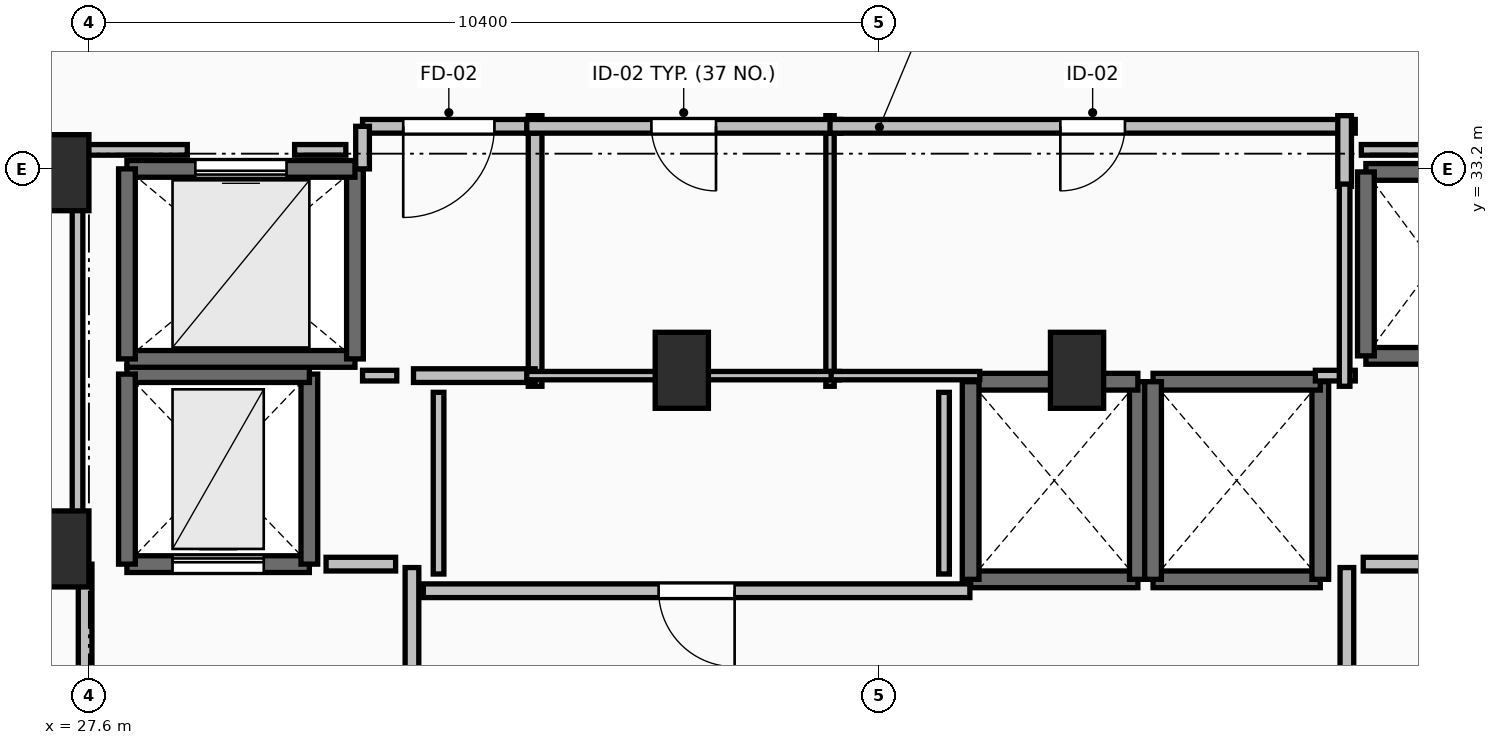
"""IFC4 building model, lengths in metres.
Left out: names, types, materials, properties, quantities, classifications, styles, units other than length and angle.
Written with IfcOpenShell. Run it as: python <this file> out.ifc"""

import sys

from ifc_helpers import new_model, si_unit, direction, frame, frame_2d, origin, origin_2d, place, context, subcontext, project, spatial, rectangle, extrude, element, fill, save


model = new_model("IFC4")
c1 = context("Model", 3, precision=1e-05, world=origin(), true_north=direction((0.0, 1.0)))
c2 = subcontext(c1, "Body", "Model", "MODEL_VIEW")
j1 = project(units=[si_unit("LENGTHUNIT", "METRE"), si_unit("PLANEANGLEUNIT", "RADIAN")], contexts=[c1])
p1 = place(None, origin())
s1 = spatial("IfcSite", under=j1, at=p1, CompositionType="ELEMENT")
p2 = place(p1, origin())
s2 = spatial("IfcBuilding", under=s1, at=p2, CompositionType="ELEMENT")
p3 = place(p2, frame((0.0, 0.0, 182.6)))
s3 = spatial("IfcBuildingStorey", under=s2, at=p3, CompositionType="ELEMENT", Elevation=182.6)
for number, where, z_axis, x_axis in (
    (1, (27.25, 28.2, 0.0), (0.0, 0.0, 1.0), (1.0, 0.0, 0.0)),
    (2, (27.25, 33.15, 0.0), (0.0, 0.0, 1.0), (1.0, 0.0, 0.0)),
    (3, (35.4, 30.55, 0.0), (0.0, 0.0, 1.0), (1.0, 0.0, 0.0)),
    (4, (40.6, 30.55, 0.0), (0.0, 0.0, 1.0), (1.0, 0.0, 0.0)),
):
    element("IfcColumn", number, at=place(p3, frame(where, z_axis=z_axis, x_axis=x_axis)), inside=s3, PredefinedType="PILASTER", context=c2, shape_type="SweptSolid", body=[
        extrude(rectangle(XDim=0.7, YDim=1.0, at=origin_2d()), origin(), (0.0, 0.0, 1.0), 3.5),
    ])
p4 = place(p3, frame((39.2, 27.8, 0.0), z_axis=(0.0, 0.0, 1.0), x_axis=(1.0, 0.0, 0.0)))
e5 = element("IfcWall", 5, at=p4, inside=s3, PredefinedType="SOLIDWALL", context=c2, shape_type="SweptSolid", body=[
    extrude(rectangle(XDim=2.2, YDim=0.22, at=frame_2d((1.1, 0.0))), origin(), (0.0, 0.0, 1.0), 3.24),
])
p5 = place(p3, frame((41.4, 27.8, 0.0), z_axis=(0.0, 0.0, 1.0), x_axis=(0.0, 1.0, 0.0)))
e6 = element("IfcWall", 6, at=p5, inside=s3, PredefinedType="SOLIDWALL", context=c2, shape_type="SweptSolid", body=[
    extrude(rectangle(XDim=2.6, YDim=0.22, at=frame_2d((1.3, 0.0))), origin(), (0.0, 0.0, 1.0), 3.24),
])
p6 = place(p3, frame((41.4, 30.4, 0.0), z_axis=(0.0, 0.0, 1.0), x_axis=(-1.0, 0.0, 0.0)))
e7 = element("IfcWall", 7, at=p6, inside=s3, PredefinedType="SOLIDWALL", context=c2, shape_type="SweptSolid", body=[
    extrude(rectangle(XDim=2.2, YDim=0.22, at=frame_2d((1.1, 0.0))), origin(), (0.0, 0.0, 1.0), 3.24),
])
p7 = place(p3, frame((39.2, 30.4, 0.0), z_axis=(0.0, 0.0, 1.0), x_axis=(0.0, -1.0, 0.0)))
e8 = element("IfcWall", 8, at=p7, inside=s3, PredefinedType="SOLIDWALL", context=c2, shape_type="SweptSolid", body=[
    extrude(rectangle(XDim=2.6, YDim=0.22, at=frame_2d((1.3, 0.0))), origin(), (0.0, 0.0, 1.0), 3.24),
])
p8 = place(p3, frame((41.6, 27.8, 0.0), z_axis=(0.0, 0.0, 1.0), x_axis=(1.0, 0.0, 0.0)))
e9 = element("IfcWall", 9, at=p8, inside=s3, PredefinedType="SOLIDWALL", context=c2, shape_type="SweptSolid", body=[
    extrude(rectangle(XDim=2.2, YDim=0.22, at=frame_2d((1.1, 0.0))), origin(), (0.0, 0.0, 1.0), 3.24),
])
p9 = place(p3, frame((43.8, 27.8, 0.0), z_axis=(0.0, 0.0, 1.0), x_axis=(0.0, 1.0, 0.0)))
e10 = element("IfcWall", 10, at=p9, inside=s3, PredefinedType="SOLIDWALL", context=c2, shape_type="SweptSolid", body=[
    extrude(rectangle(XDim=2.6, YDim=0.22, at=frame_2d((1.3, 0.0))), origin(), (0.0, 0.0, 1.0), 3.24),
])
p10 = place(p3, frame((43.8, 30.4, 0.0), z_axis=(0.0, 0.0, 1.0), x_axis=(-1.0, 0.0, 0.0)))
e11 = element("IfcWall", 11, at=p10, inside=s3, PredefinedType="SOLIDWALL", context=c2, shape_type="SweptSolid", body=[
    extrude(rectangle(XDim=2.2, YDim=0.22, at=frame_2d((1.1, 0.0))), origin(), (0.0, 0.0, 1.0), 3.24),
])
p11 = place(p3, frame((41.6, 30.4, 0.0), z_axis=(0.0, 0.0, 1.0), x_axis=(0.0, -1.0, 0.0)))
e12 = element("IfcWall", 12, at=p11, inside=s3, PredefinedType="SOLIDWALL", context=c2, shape_type="SweptSolid", body=[
    extrude(rectangle(XDim=2.6, YDim=0.22, at=frame_2d((1.3, 0.0))), origin(), (0.0, 0.0, 1.0), 3.24),
])
for number, where, z_axis, x_axis in (
    (13, (44.4, 30.74, 0.0), (0.0, 0.0, 1.0), (1.0, 0.0, 0.0)),
    (14, (46.2, 33.16, 0.0), (0.0, 0.0, 1.0), (-1.0, 0.0, 0.0)),
):
    element("IfcWall", number, at=place(p3, frame(where, z_axis=z_axis, x_axis=x_axis)), inside=s3, PredefinedType="SOLIDWALL", context=c2, shape_type="SweptSolid", body=[
        extrude(rectangle(XDim=1.8, YDim=0.22, at=frame_2d((0.9, 0.0))), origin(), (0.0, 0.0, 1.0), 3.24),
    ])
p12 = place(p3, frame((44.4, 33.16, 0.0), z_axis=(0.0, 0.0, 1.0), x_axis=(0.0, -1.0, 0.0)))
e15 = element("IfcWall", 15, at=p12, inside=s3, PredefinedType="SOLIDWALL", context=c2, shape_type="SweptSolid", body=[
    extrude(rectangle(XDim=2.42, YDim=0.22, at=frame_2d((1.21, 0.0))), origin(), (0.0, 0.0, 1.0), 3.24),
])
p13 = place(p3, frame((28.1, 28.0, 0.0), z_axis=(0.0, 0.0, 1.0), x_axis=(1.0, 0.0, 0.0)))
e16 = element("IfcWall", 16, at=p13, inside=s3, PredefinedType="SHEAR", context=c2, shape_type="SweptSolid", body=[
    extrude(rectangle(XDim=2.4, YDim=0.22, at=frame_2d((1.2, 0.0))), origin(), (0.0, 0.0, 1.0), 3.24),
])
p14 = place(p13, frame((0.6, 0.0, 0.0)))
e17 = element("IfcOpeningElement", 17, at=p14, cuts=e16, PredefinedType="OPENING", context=c2, shape_type="SweptSolid", body=[
    extrude(rectangle(XDim=1.2, YDim=2.2, at=frame_2d((0.6, 1.1))), frame((0.0, 0.125, 0.0), z_axis=(0.0, -1.0, 0.0), x_axis=(1.0, 0.0, 0.0)), (0.0, 0.0, 1.0), 0.25),
])
p15 = place(p3, frame((30.5, 28.0, 0.0), z_axis=(0.0, 0.0, 1.0), x_axis=(0.0, 1.0, 0.0)))
e18 = element("IfcWall", 18, at=p15, inside=s3, PredefinedType="SHEAR", context=c2, shape_type="SweptSolid", body=[
    extrude(rectangle(XDim=2.5, YDim=0.22, at=frame_2d((1.25, 0.0))), origin(), (0.0, 0.0, 1.0), 3.24),
])
p16 = place(p3, frame((30.5, 30.5, 0.0), z_axis=(0.0, 0.0, 1.0), x_axis=(-1.0, 0.0, 0.0)))
e19 = element("IfcWall", 19, at=p16, inside=s3, PredefinedType="SHEAR", context=c2, shape_type="SweptSolid", body=[
    extrude(rectangle(XDim=2.4, YDim=0.22, at=frame_2d((1.2, 0.0))), origin(), (0.0, 0.0, 1.0), 3.24),
])
p17 = place(p3, frame((28.1, 30.5, 0.0), z_axis=(0.0, 0.0, 1.0), x_axis=(0.0, -1.0, 0.0)))
e20 = element("IfcWall", 20, at=p17, inside=s3, PredefinedType="SHEAR", context=c2, shape_type="SweptSolid", body=[
    extrude(rectangle(XDim=2.5, YDim=0.22, at=frame_2d((1.25, 0.0))), origin(), (0.0, 0.0, 1.0), 3.24),
])
p18 = place(p3, frame((28.1, 30.7, 0.0), z_axis=(0.0, 0.0, 1.0), x_axis=(1.0, 0.0, 0.0)))
e21 = element("IfcWall", 21, at=p18, inside=s3, PredefinedType="SOLIDWALL", context=c2, shape_type="SweptSolid", body=[
    extrude(rectangle(XDim=3.0, YDim=0.22, at=frame_2d((1.5, 0.0))), origin(), (0.0, 0.0, 1.0), 3.24),
])
p19 = place(p3, frame((31.1, 30.7, 0.0), z_axis=(0.0, 0.0, 1.0), x_axis=(0.0, 1.0, 0.0)))
e22 = element("IfcWall", 22, at=p19, inside=s3, PredefinedType="SOLIDWALL", context=c2, shape_type="SweptSolid", body=[
    extrude(rectangle(XDim=2.5, YDim=0.22, at=frame_2d((1.25, 0.0))), origin(), (0.0, 0.0, 1.0), 3.24),
])
p20 = place(p3, frame((31.1, 33.2, 0.0), z_axis=(0.0, 0.0, 1.0), x_axis=(-1.0, 0.0, 0.0)))
e23 = element("IfcWall", 23, at=p20, inside=s3, PredefinedType="SOLIDWALL", context=c2, shape_type="SweptSolid", body=[
    extrude(rectangle(XDim=3.0, YDim=0.22, at=frame_2d((1.5, 0.0))), origin(), (0.0, 0.0, 1.0), 3.24),
])
p21 = place(p20, frame((0.9, 0.0, 0.0)))
e24 = element("IfcOpeningElement", 24, at=p21, cuts=e23, PredefinedType="OPENING", context=c2, shape_type="SweptSolid", body=[
    extrude(rectangle(XDim=1.2, YDim=2.2, at=frame_2d((0.6, 1.1))), frame((0.0, 0.125, 0.0), z_axis=(0.0, -1.0, 0.0), x_axis=(1.0, 0.0, 0.0)), (0.0, 0.0, 1.0), 0.25),
])
p22 = place(p3, frame((28.1, 33.2, 0.0), z_axis=(0.0, 0.0, 1.0), x_axis=(0.0, -1.0, 0.0)))
e25 = element("IfcWall", 25, at=p22, inside=s3, PredefinedType="SOLIDWALL", context=c2, shape_type="SweptSolid", body=[
    extrude(rectangle(XDim=2.5, YDim=0.22, at=frame_2d((1.25, 0.0))), origin(), (0.0, 0.0, 1.0), 3.24),
])
p23 = place(p3, frame((31.85, 24.045, 0.0), z_axis=(0.0, 0.0, 1.0), x_axis=(0.0, 1.0, 0.0)))
e26 = element("IfcWall", 26, at=p23, inside=s3, PredefinedType="PARTITIONING", context=c2, shape_type="SweptSolid", body=[
    extrude(rectangle(XDim=3.91, YDim=0.18, at=frame_2d((1.955, 0.0))), origin(), (0.0, 0.0, 1.0), 3.24),
])
p24 = place(p23, frame((1.355, 0.0, 0.0)))
e27 = element("IfcOpeningElement", 27, at=p24, cuts=e26, PredefinedType="OPENING", context=c2, shape_type="SweptSolid", body=[
    extrude(rectangle(XDim=1.2, YDim=2.15, at=frame_2d((0.6, 1.075))), frame((0.0, 0.105, 0.0), z_axis=(0.0, -1.0, 0.0), x_axis=(1.0, 0.0, 0.0)), (0.0, 0.0, 1.0), 0.21),
])
p25 = place(p3, frame((27.55, 28.0, 0.0), z_axis=(0.0, 0.0, 1.0), x_axis=(0.0, -1.0, 0.0)))
e28 = element("IfcWall", 28, at=p25, inside=s3, PredefinedType="PARTITIONING", context=c2, shape_type="SweptSolid", body=[
    extrude(rectangle(XDim=4.05, YDim=0.18, at=frame_2d((2.025, 0.0))), origin(), (0.0, 0.0, 1.0), 3.24),
])
p26 = place(p25, frame((1.425, 0.0, 0.0)))
e29 = element("IfcOpeningElement", 29, at=p26, cuts=e28, PredefinedType="OPENING", context=c2, shape_type="SweptSolid", body=[
    extrude(rectangle(XDim=1.2, YDim=2.15, at=frame_2d((0.6, 1.075))), frame((0.0, 0.105, 0.0), z_axis=(0.0, -1.0, 0.0), x_axis=(1.0, 0.0, 0.0)), (0.0, 0.0, 1.0), 0.21),
])
p27 = place(p3, frame((44.15, 27.955, 0.0), z_axis=(0.0, 0.0, 1.0), x_axis=(0.0, -1.0, 0.0)))
e30 = element("IfcWall", 30, at=p27, inside=s3, PredefinedType="PARTITIONING", context=c2, shape_type="SweptSolid", body=[
    extrude(rectangle(XDim=3.91, YDim=0.18, at=frame_2d((1.955, 0.0))), origin(), (0.0, 0.0, 1.0), 3.24),
])
p28 = place(p27, frame((1.355, 0.0, 0.0)))
e31 = element("IfcOpeningElement", 31, at=p28, cuts=e30, PredefinedType="OPENING", context=c2, shape_type="SweptSolid", body=[
    extrude(rectangle(XDim=1.2, YDim=2.15, at=frame_2d((0.6, 1.075))), frame((0.0, 0.105, 0.0), z_axis=(0.0, -1.0, 0.0), x_axis=(1.0, 0.0, 0.0)), (0.0, 0.0, 1.0), 0.21),
])
p29 = place(p3, frame((33.47, 30.34, 0.0), z_axis=(0.0, 0.0, 1.0), x_axis=(0.0, 1.0, 0.0)))
e32 = element("IfcWall", 32, at=p29, inside=s3, PredefinedType="PARTITIONING", context=c2, shape_type="SweptSolid", body=[
    extrude(rectangle(XDim=3.56, YDim=0.18, at=frame_2d((1.78, 0.0))), origin(), (0.0, 0.0, 1.0), 3.24),
])
p30 = place(p3, frame((31.87, 30.48, 0.0), z_axis=(0.0, 0.0, 1.0), x_axis=(1.0, 0.0, 0.0)))
e33 = element("IfcWall", 33, at=p30, inside=s3, PredefinedType="PARTITIONING", context=c2, shape_type="SweptSolid", body=[
    extrude(rectangle(XDim=1.6, YDim=0.18, at=frame_2d((0.8, 0.0))), origin(), (0.0, 0.0, 1.0), 3.24),
])
p31 = place(p3, frame((33.47, 33.76, 0.0), z_axis=(0.0, 0.0, 1.0), x_axis=(-1.0, 0.0, 0.0)))
e34 = element("IfcWall", 34, at=p31, inside=s3, PredefinedType="PARTITIONING", context=c2, shape_type="SweptSolid", body=[
    extrude(rectangle(XDim=2.27, YDim=0.18, at=frame_2d((1.135, 0.0))), origin(), (0.0, 0.0, 1.0), 3.24),
])
p32 = place(p31, frame((0.535, 0.0, 0.0)))
e35 = element("IfcOpeningElement", 35, at=p32, cuts=e34, PredefinedType="OPENING", context=c2, shape_type="SweptSolid", body=[
    extrude(rectangle(XDim=1.2, YDim=2.15, at=frame_2d((0.6, 1.075))), frame((0.0, 0.105, 0.0), z_axis=(0.0, -1.0, 0.0), x_axis=(1.0, 0.0, 0.0)), (0.0, 0.0, 1.0), 0.21),
])
p33 = place(p3, frame((31.2, 33.76, 0.0), z_axis=(0.0, 0.0, 1.0), x_axis=(0.0, -1.0, 0.0)))
e36 = element("IfcWall", 36, at=p33, inside=s3, PredefinedType="PARTITIONING", context=c2, shape_type="SweptSolid", body=[
    extrude(rectangle(XDim=0.56, YDim=0.18, at=frame_2d((0.28, 0.0))), origin(), (0.0, 0.0, 1.0), 3.24),
])
p34 = place(p3, frame((39.19, 27.65, 0.0), z_axis=(0.0, 0.0, 1.0), x_axis=(-1.0, 0.0, 0.0)))
e37 = element("IfcWall", 37, at=p34, inside=s3, PredefinedType="PARTITIONING", context=c2, shape_type="SweptSolid", body=[
    extrude(rectangle(XDim=7.19, YDim=0.18, at=frame_2d((3.595, 0.0))), origin(), (0.0, 0.0, 1.0), 3.24),
])
p35 = place(p34, frame((3.095, 0.0, 0.0)))
e38 = element("IfcOpeningElement", 38, at=p35, cuts=e37, PredefinedType="OPENING", context=c2, shape_type="SweptSolid", body=[
    extrude(rectangle(XDim=1.0, YDim=2.15, at=frame_2d((0.5, 1.075))), frame((0.0, 0.105, 0.0), z_axis=(0.0, -1.0, 0.0), x_axis=(1.0, 0.0, 0.0)), (0.0, 0.0, 1.0), 0.21),
])
p36 = place(p3, frame((37.35, 30.34, 0.0), z_axis=(0.0, 0.0, 1.0), x_axis=(0.0, 1.0, 0.0)))
e39 = element("IfcWall", 39, at=p36, inside=s3, PredefinedType="PARTITIONING", context=c2, shape_type="SweptSolid", body=[
    extrude(rectangle(XDim=3.56, YDim=0.11, at=frame_2d((1.78, 0.0))), origin(), (0.0, 0.0, 1.0), 2.432),
])
p37 = place(p3, frame((33.36, 30.48, 0.0), z_axis=(0.0, 0.0, 1.0), x_axis=(1.0, 0.0, 0.0)))
e40 = element("IfcWall", 40, at=p37, inside=s3, PredefinedType="PARTITIONING", context=c2, shape_type="SweptSolid", body=[
    extrude(rectangle(XDim=4.115, YDim=0.11, at=frame_2d((2.058, 0.0))), origin(), (0.0, 0.0, 1.0), 2.432),
])
p38 = place(p3, frame((37.49, 33.76, 0.0), z_axis=(0.0, 0.0, 1.0), x_axis=(-1.0, 0.0, 0.0)))
e41 = element("IfcWall", 41, at=p38, inside=s3, PredefinedType="PARTITIONING", context=c2, shape_type="SweptSolid", body=[
    extrude(rectangle(XDim=4.13, YDim=0.18, at=frame_2d((2.065, 0.0))), origin(), (0.0, 0.0, 1.0), 3.24),
])
p39 = place(p38, frame((1.64, 0.0, 0.0)))
e42 = element("IfcOpeningElement", 42, at=p39, cuts=e41, PredefinedType="OPENING", context=c2, shape_type="SweptSolid", body=[
    extrude(rectangle(XDim=0.85, YDim=2.1, at=frame_2d((0.425, 1.05))), frame((0.0, 0.105, 0.0), z_axis=(0.0, -1.0, 0.0), x_axis=(1.0, 0.0, 0.0)), (0.0, 0.0, 1.0), 0.21),
])
p40 = place(p3, frame((37.365, 30.48, 0.0), z_axis=(0.0, 0.0, 1.0), x_axis=(1.0, 0.0, 0.0)))
e43 = element("IfcWall", 43, at=p40, inside=s3, PredefinedType="PARTITIONING", context=c2, shape_type="SweptSolid", body=[
    extrude(rectangle(XDim=1.955, YDim=0.11, at=frame_2d((0.978, 0.0))), origin(), (0.0, 0.0, 1.0), 2.432),
])
p41 = place(p3, frame((44.26, 33.76, 0.0), z_axis=(0.0, 0.0, 1.0), x_axis=(-1.0, 0.0, 0.0)))
e44 = element("IfcWall", 44, at=p41, inside=s3, PredefinedType="PARTITIONING", context=c2, shape_type="SweptSolid", body=[
    extrude(rectangle(XDim=6.91, YDim=0.18, at=frame_2d((3.455, 0.0))), origin(), (0.0, 0.0, 1.0), 3.24),
])
p42 = place(p41, frame((3.03, 0.0, 0.0)))
e45 = element("IfcOpeningElement", 45, at=p42, cuts=e44, PredefinedType="OPENING", context=c2, shape_type="SweptSolid", body=[
    extrude(rectangle(XDim=0.85, YDim=2.1, at=frame_2d((0.425, 1.05))), frame((0.0, 0.105, 0.0), z_axis=(0.0, -1.0, 0.0), x_axis=(1.0, 0.0, 0.0)), (0.0, 0.0, 1.0), 0.21),
])
p43 = place(p3, frame((44.12, 32.97, 0.0), z_axis=(0.0, 0.0, 1.0), x_axis=(0.0, 1.0, 0.0)))
e46 = element("IfcWall", 46, at=p43, inside=s3, PredefinedType="PARTITIONING", context=c2, shape_type="SweptSolid", body=[
    extrude(rectangle(XDim=0.93, YDim=0.18, at=frame_2d((0.465, 0.0))), origin(), (0.0, 0.0, 1.0), 3.24),
])
for number, where, z_axis, x_axis in (
    (47, (31.635, 28.0, 0.0), (0.0, 0.0, 1.0), (-1.0, 0.0, 0.0)),
    (48, (45.28, 28.0, 0.0), (0.0, 0.0, 1.0), (-1.0, 0.0, 0.0)),
):
    element("IfcWall", number, at=place(p3, frame(where, z_axis=z_axis, x_axis=x_axis)), inside=s3, PredefinedType="PARTITIONING", context=c2, shape_type="SweptSolid", body=[
        extrude(rectangle(XDim=0.915, YDim=0.18, at=frame_2d((0.458, 0.0))), origin(), (0.0, 0.0, 1.0), 3.24),
    ])
p44 = place(p3, frame((31.2, 30.48, 0.0), z_axis=(0.0, 0.0, 1.0), x_axis=(1.0, 0.0, 0.0)))
e49 = element("IfcWall", 49, at=p44, inside=s3, PredefinedType="PARTITIONING", context=c2, shape_type="SweptSolid", body=[
    extrude(rectangle(XDim=0.45, YDim=0.14, at=frame_2d((0.225, 0.0))), origin(), (0.0, 0.0, 1.0), 3.24),
])
p45 = place(p3, frame((43.735, 30.48, 0.0), z_axis=(0.0, 0.0, 1.0), x_axis=(1.0, 0.0, 0.0)))
e50 = element("IfcWall", 50, at=p45, inside=s3, PredefinedType="PARTITIONING", context=c2, shape_type="SweptSolid", body=[
    extrude(rectangle(XDim=0.525, YDim=0.14, at=frame_2d((0.262, 0.0))), origin(), (0.0, 0.0, 1.0), 3.24),
])
p46 = place(p3, frame((44.12, 30.34, 0.0), z_axis=(0.0, 0.0, 1.0), x_axis=(0.0, 1.0, 0.0)))
e51 = element("IfcWall", 51, at=p46, inside=s3, PredefinedType="PARTITIONING", context=c2, shape_type="SweptSolid", body=[
    extrude(rectangle(XDim=2.66, YDim=0.14, at=frame_2d((1.33, 0.0))), origin(), (0.0, 0.0, 1.0), 3.24),
])
for number, where, z_axis, x_axis in (
    (52, (32.2, 30.26, 0.0), (0.0, 0.0, 1.0), (0.0, -1.0, 0.0)),
    (53, (38.85, 27.87, 0.0), (0.0, 0.0, 1.0), (0.0, 1.0, 0.0)),
):
    element("IfcWall", number, at=place(p3, frame(where, z_axis=z_axis, x_axis=x_axis)), inside=s3, PredefinedType="PARTITIONING", context=c2, shape_type="SweptSolid", body=[
        extrude(rectangle(XDim=2.39, YDim=0.14, at=frame_2d((1.195, 0.0))), origin(), (0.0, 0.0, 1.0), 3.24),
    ])
p47 = place(p3, frame((48.55, 33.45, 0.0), z_axis=(0.0, 0.0, 1.0), x_axis=(-1.0, 0.0, 0.0)))
e54 = element("IfcWall", 54, at=p47, inside=s3, PredefinedType="PARTITIONING", context=c2, shape_type="SweptSolid", body=[
    extrude(rectangle(XDim=4.21, YDim=0.14, at=frame_2d((2.105, 0.0))), origin(), (0.0, 0.0, 1.0), 2.432),
])
p48 = place(p3, frame((30.98, 33.45, 0.0), z_axis=(0.0, 0.0, 1.0), x_axis=(-1.0, 0.0, 0.0)))
e55 = element("IfcWall", 55, at=p48, inside=s3, PredefinedType="PARTITIONING", context=c2, shape_type="SweptSolid", body=[
    extrude(rectangle(XDim=0.674, YDim=0.14, at=frame_2d((0.337, 0.0))), origin(), (0.0, 0.0, 1.0), 3.24),
])
p49 = place(p3, frame((28.894, 33.45, 0.0), z_axis=(0.0, 0.0, 1.0), x_axis=(-1.0, 0.0, 0.0)))
e56 = element("IfcWall", 56, at=p49, inside=s3, PredefinedType="PARTITIONING", context=c2, shape_type="SweptSolid", body=[
    extrude(rectangle(XDim=1.444, YDim=0.14, at=frame_2d((0.722, 0.0))), origin(), (0.0, 0.0, 1.0), 2.432),
])
p50 = place(p3, frame((27.45, 33.45, 0.0), z_axis=(0.0, 0.0, 1.0), x_axis=(0.0, -1.0, 0.0)))
e57 = element("IfcWall", 57, at=p50, inside=s3, PredefinedType="PARTITIONING", context=c2, shape_type="SweptSolid", body=[
    extrude(rectangle(XDim=5.254, YDim=0.14, at=frame_2d((2.627, 0.0))), origin(), (0.0, 0.0, 1.0), 2.432),
])
p51 = place(p14, origin())
e58 = element("IfcDoor", 58, at=p51, inside=s3, OperationType="SLIDING_TO_LEFT", PredefinedType="DOOR", context=c2, shape_type="SweptSolid", body=[
    extrude(rectangle(XDim=1.2, YDim=2.2, at=frame_2d((0.6, 1.1))), frame((0.0, 0.025, 0.0), z_axis=(0.0, -1.0, 0.0), x_axis=(1.0, 0.0, 0.0)), (0.0, 0.0, 1.0), 0.05),
])
fill(e17, e58)
p52 = place(p21, origin())
e59 = element("IfcDoor", 59, at=p52, inside=s3, OperationType="SLIDING_TO_LEFT", PredefinedType="DOOR", context=c2, shape_type="SweptSolid", body=[
    extrude(rectangle(XDim=1.2, YDim=2.2, at=frame_2d((0.6, 1.1))), frame((0.0, 0.025, 0.0), z_axis=(0.0, -1.0, 0.0), x_axis=(1.0, 0.0, 0.0)), (0.0, 0.0, 1.0), 0.05),
])
fill(e24, e59)
p53 = place(p32, origin())
e60 = element("IfcDoor", 60, at=p53, inside=s3, OperationType="SINGLE_SWING_RIGHT", PredefinedType="DOOR", context=c2, shape_type="SweptSolid", body=[
    extrude(rectangle(XDim=1.2, YDim=2.15, at=frame_2d((0.6, 1.075))), frame((0.0, 0.025, 0.0), z_axis=(0.0, -1.0, 0.0), x_axis=(1.0, 0.0, 0.0)), (0.0, 0.0, 1.0), 0.05),
])
fill(e35, e60)
p54 = place(p35, origin())
e61 = element("IfcDoor", 61, at=p54, inside=s3, OperationType="SINGLE_SWING_LEFT", PredefinedType="DOOR", context=c2, shape_type="SweptSolid", body=[
    extrude(rectangle(XDim=1.0, YDim=2.15, at=frame_2d((0.5, 1.075))), frame((0.0, 0.025, 0.0), z_axis=(0.0, -1.0, 0.0), x_axis=(1.0, 0.0, 0.0)), (0.0, 0.0, 1.0), 0.05),
])
fill(e38, e61)
p55 = place(p39, origin())
e62 = element("IfcDoor", 62, at=p55, inside=s3, OperationType="SINGLE_SWING_LEFT", PredefinedType="DOOR", context=c2, shape_type="SweptSolid", body=[
    extrude(rectangle(XDim=0.85, YDim=2.1, at=frame_2d((0.425, 1.05))), frame((0.0, 0.025, 0.0), z_axis=(0.0, -1.0, 0.0), x_axis=(1.0, 0.0, 0.0)), (0.0, 0.0, 1.0), 0.05),
])
fill(e42, e62)
p56 = place(p42, origin())
e63 = element("IfcDoor", 63, at=p56, inside=s3, OperationType="SINGLE_SWING_RIGHT", PredefinedType="DOOR", context=c2, shape_type="SweptSolid", body=[
    extrude(rectangle(XDim=0.85, YDim=2.1, at=frame_2d((0.425, 1.05))), frame((0.0, 0.025, 0.0), z_axis=(0.0, -1.0, 0.0), x_axis=(1.0, 0.0, 0.0)), (0.0, 0.0, 1.0), 0.05),
])
fill(e45, e63)
save(model, sys.argv[1])
